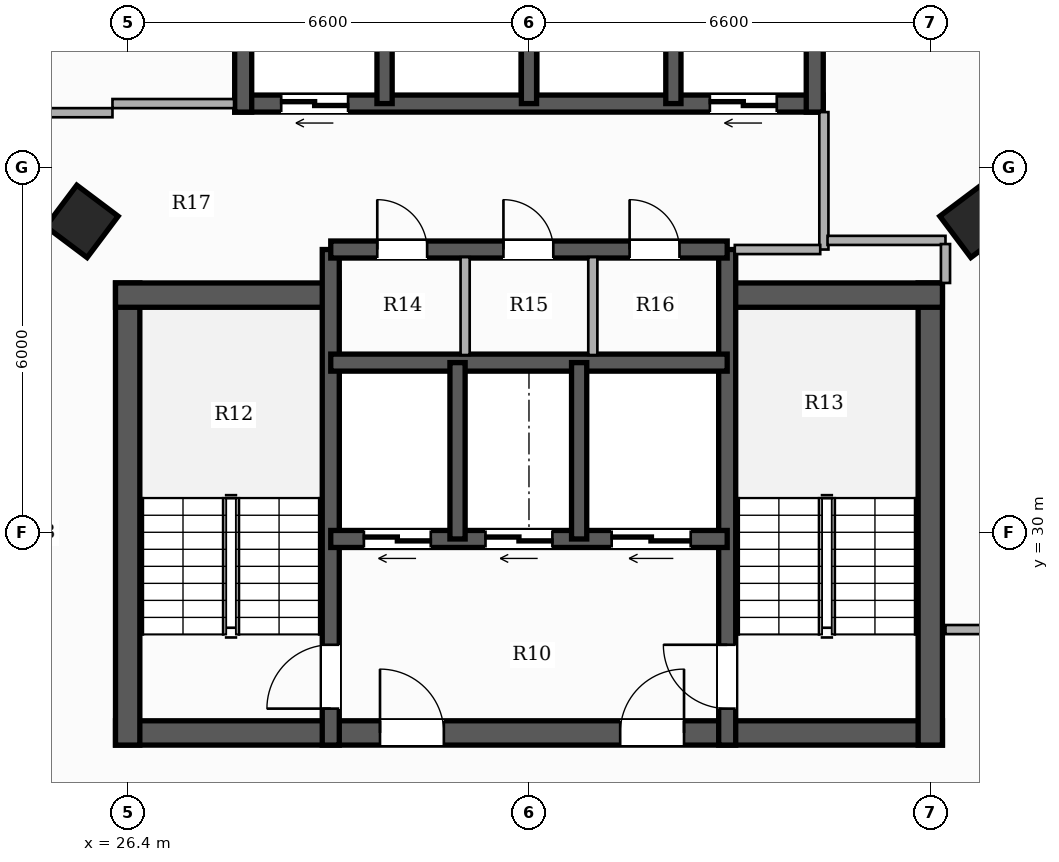
"""IFC4 building model, lengths in metres.
Left out: names, types, materials, properties, quantities, classifications, styles, units other than length and angle.
Written with IfcOpenShell. Run it as: python <this file> out.ifc"""

import sys

from ifc_helpers import new_model, si_unit, direction, frame, frame_2d, origin, origin_2d, place, context, subcontext, project, spatial, rectangle, hollow_rectangle, extrude, element, fill, save


model = new_model("IFC4")
c1 = context("Model", 3, precision=1e-05, world=origin(), true_north=direction((0.0, 1.0)))
c2 = subcontext(c1, "Body", "Model", "MODEL_VIEW")
j1 = project(units=[si_unit("LENGTHUNIT", "METRE"), si_unit("PLANEANGLEUNIT", "RADIAN")], contexts=[c1])
p1 = place(None, origin())
s1 = spatial("IfcSite", under=j1, at=p1, CompositionType="ELEMENT")
p2 = place(p1, origin())
s2 = spatial("IfcBuilding", under=s1, at=p2, CompositionType="ELEMENT")
p3 = place(p2, frame((0.0, 0.0, 150.65)))
s3 = spatial("IfcBuildingStorey", under=s2, at=p3, CompositionType="ELEMENT", Elevation=150.65)
p4 = place(p3, frame((26.2, 26.7, 0.0), z_axis=(0.0, 0.0, 1.0), x_axis=(1.0, 0.0, 0.0)))
e1 = element("IfcWall", 1, at=p4, inside=s3, PredefinedType="SHEAR", context=c2, shape_type="SweptSolid", body=[
    extrude(rectangle(XDim=13.6, YDim=0.4, at=frame_2d((6.8, 0.0))), origin(), (0.0, 0.0, 1.0), 3.3),
])
p5 = place(p4, frame((4.35, 0.0, 0.0)))
e2 = element("IfcOpeningElement", 2, at=p5, cuts=e1, PredefinedType="OPENING", context=c2, shape_type="SweptSolid", body=[
    extrude(rectangle(XDim=1.05, YDim=2.15, at=frame_2d((0.525, 1.075))), frame((0.0, 0.21, 0.0), z_axis=(0.0, -1.0, 0.0), x_axis=(1.0, 0.0, 0.0)), (0.0, 0.0, 1.0), 0.42),
])
p6 = place(p4, frame((8.3, 0.0, 0.0)))
e3 = element("IfcOpeningElement", 3, at=p6, cuts=e1, PredefinedType="OPENING", context=c2, shape_type="SweptSolid", body=[
    extrude(rectangle(XDim=1.05, YDim=2.15, at=frame_2d((0.525, 1.075))), frame((0.0, 0.21, 0.0), z_axis=(0.0, -1.0, 0.0), x_axis=(1.0, 0.0, 0.0)), (0.0, 0.0, 1.0), 0.42),
])
p7 = place(p3, frame((26.4, 26.5, 0.0), z_axis=(0.0, 0.0, 1.0), x_axis=(0.0, 1.0, 0.0)))
e4 = element("IfcWall", 4, at=p7, inside=s3, PredefinedType="SHEAR", context=c2, shape_type="SweptSolid", body=[
    extrude(rectangle(XDim=7.6, YDim=0.4, at=frame_2d((3.8, 0.0))), origin(), (0.0, 0.0, 1.0), 3.3),
])
p8 = place(p3, frame((26.2, 33.9, 0.0), z_axis=(0.0, 0.0, 1.0), x_axis=(1.0, 0.0, 0.0)))
e5 = element("IfcWall", 5, at=p8, inside=s3, PredefinedType="SHEAR", context=c2, shape_type="SweptSolid", body=[
    extrude(rectangle(XDim=3.68, YDim=0.4, at=frame_2d((1.84, 0.0))), origin(), (0.0, 0.0, 1.0), 3.3),
])
p9 = place(p3, frame((39.6, 26.5, 0.0), z_axis=(0.0, 0.0, 1.0), x_axis=(0.0, 1.0, 0.0)))
e6 = element("IfcWall", 6, at=p9, inside=s3, PredefinedType="SHEAR", context=c2, shape_type="SweptSolid", body=[
    extrude(rectangle(XDim=7.6, YDim=0.4, at=frame_2d((3.8, 0.0))), origin(), (0.0, 0.0, 1.0), 3.3),
])
p10 = place(p3, frame((36.12, 33.9, 0.0), z_axis=(0.0, 0.0, 1.0), x_axis=(1.0, 0.0, 0.0)))
e7 = element("IfcWall", 7, at=p10, inside=s3, PredefinedType="SHEAR", context=c2, shape_type="SweptSolid", body=[
    extrude(rectangle(XDim=3.68, YDim=0.4, at=frame_2d((1.84, 0.0))), origin(), (0.0, 0.0, 1.0), 3.3),
])
p11 = place(p3, frame((29.74, 26.5, 0.0), z_axis=(0.0, 0.0, 1.0), x_axis=(0.0, 1.0, 0.0)))
e8 = element("IfcWall", 8, at=p11, inside=s3, PredefinedType="SHEAR", context=c2, shape_type="SweptSolid", body=[
    extrude(rectangle(XDim=8.15, YDim=0.28, at=frame_2d((4.075, 0.0))), origin(), (0.0, 0.0, 1.0), 3.3),
])
p12 = place(p11, frame((0.6, 0.0, 0.0)))
e9 = element("IfcOpeningElement", 9, at=p12, cuts=e8, PredefinedType="OPENING", context=c2, shape_type="SweptSolid", body=[
    extrude(rectangle(XDim=1.05, YDim=2.15, at=frame_2d((0.525, 1.075))), frame((0.0, 0.15, 0.0), z_axis=(0.0, -1.0, 0.0), x_axis=(1.0, 0.0, 0.0)), (0.0, 0.0, 1.0), 0.3),
])
p13 = place(p3, frame((36.26, 26.5, 0.0), z_axis=(0.0, 0.0, 1.0), x_axis=(0.0, 1.0, 0.0)))
e10 = element("IfcWall", 10, at=p13, inside=s3, PredefinedType="SHEAR", context=c2, shape_type="SweptSolid", body=[
    extrude(rectangle(XDim=8.15, YDim=0.28, at=frame_2d((4.075, 0.0))), origin(), (0.0, 0.0, 1.0), 3.3),
])
p14 = place(p13, frame((0.6, 0.0, 0.0)))
e11 = element("IfcOpeningElement", 11, at=p14, cuts=e10, PredefinedType="OPENING", context=c2, shape_type="SweptSolid", body=[
    extrude(rectangle(XDim=1.05, YDim=2.15, at=frame_2d((0.525, 1.075))), frame((0.0, 0.15, 0.0), z_axis=(0.0, -1.0, 0.0), x_axis=(1.0, 0.0, 0.0)), (0.0, 0.0, 1.0), 0.3),
])
p15 = place(p3, frame((36.26, 29.89, 0.0), z_axis=(0.0, 0.0, 1.0), x_axis=(-1.0, 0.0, 0.0)))
e12 = element("IfcWall", 12, at=p15, inside=s3, PredefinedType="SHEAR", context=c2, shape_type="SweptSolid", body=[
    extrude(rectangle(XDim=6.52, YDim=0.28, at=frame_2d((3.26, 0.0))), origin(), (0.0, 0.0, 1.0), 3.3),
])
p16 = place(p15, frame((4.875, 0.0, 0.0)))
e13 = element("IfcOpeningElement", 13, at=p16, cuts=e12, PredefinedType="OPENING", context=c2, shape_type="SweptSolid", body=[
    extrude(rectangle(XDim=1.1, YDim=2.2, at=frame_2d((0.55, 1.1))), frame((0.0, 0.15, 0.0), z_axis=(0.0, -1.0, 0.0), x_axis=(1.0, 0.0, 0.0)), (0.0, 0.0, 1.0), 0.3),
])
p17 = place(p15, frame((2.875, 0.0, 0.0)))
e14 = element("IfcOpeningElement", 14, at=p17, cuts=e12, PredefinedType="OPENING", context=c2, shape_type="SweptSolid", body=[
    extrude(rectangle(XDim=1.1, YDim=2.2, at=frame_2d((0.55, 1.1))), frame((0.0, 0.15, 0.0), z_axis=(0.0, -1.0, 0.0), x_axis=(1.0, 0.0, 0.0)), (0.0, 0.0, 1.0), 0.3),
])
p18 = place(p15, frame((0.6, 0.0, 0.0)))
e15 = element("IfcOpeningElement", 15, at=p18, cuts=e12, PredefinedType="OPENING", context=c2, shape_type="SweptSolid", body=[
    extrude(rectangle(XDim=1.3, YDim=2.2, at=frame_2d((0.65, 1.1))), frame((0.0, 0.15, 0.0), z_axis=(0.0, -1.0, 0.0), x_axis=(1.0, 0.0, 0.0)), (0.0, 0.0, 1.0), 0.3),
])
p19 = place(p3, frame((29.74, 32.79, 0.0), z_axis=(0.0, 0.0, 1.0), x_axis=(1.0, 0.0, 0.0)))
e16 = element("IfcWall", 16, at=p19, inside=s3, PredefinedType="SHEAR", context=c2, shape_type="SweptSolid", body=[
    extrude(rectangle(XDim=6.52, YDim=0.28, at=frame_2d((3.26, 0.0))), origin(), (0.0, 0.0, 1.0), 3.3),
])
for number, where, z_axis, x_axis in (
    (17, (31.825, 29.89, 0.0), (0.0, 0.0, 1.0), (0.0, 1.0, 0.0)),
    (18, (33.825, 29.89, 0.0), (0.0, 0.0, 1.0), (0.0, 1.0, 0.0)),
):
    element("IfcWall", number, at=place(p3, frame(where, z_axis=z_axis, x_axis=x_axis)), inside=s3, PredefinedType="SHEAR", context=c2, shape_type="SweptSolid", body=[
        extrude(rectangle(XDim=2.9, YDim=0.25, at=frame_2d((1.45, 0.0))), origin(), (0.0, 0.0, 1.0), 3.3),
    ])
p20 = place(p3, frame((29.74, 34.65, 0.0), z_axis=(0.0, 0.0, 1.0), x_axis=(1.0, 0.0, 0.0)))
e19 = element("IfcWall", 19, at=p20, inside=s3, PredefinedType="SHEAR", context=c2, shape_type="SweptSolid", body=[
    extrude(rectangle(XDim=6.52, YDim=0.28, at=frame_2d((3.26, 0.0))), origin(), (0.0, 0.0, 1.0), 3.3),
])
p21 = place(p20, frame((0.765, 0.0, 0.0)))
e20 = element("IfcOpeningElement", 20, at=p21, cuts=e19, PredefinedType="OPENING", context=c2, shape_type="SweptSolid", body=[
    extrude(rectangle(XDim=0.82, YDim=2.1, at=frame_2d((0.41, 1.05))), frame((0.0, 0.15, 0.0), z_axis=(0.0, -1.0, 0.0), x_axis=(1.0, 0.0, 0.0)), (0.0, 0.0, 1.0), 0.3),
])
p22 = place(p20, frame((2.84, 0.0, 0.0)))
e21 = element("IfcOpeningElement", 21, at=p22, cuts=e19, PredefinedType="OPENING", context=c2, shape_type="SweptSolid", body=[
    extrude(rectangle(XDim=0.82, YDim=2.1, at=frame_2d((0.41, 1.05))), frame((0.0, 0.15, 0.0), z_axis=(0.0, -1.0, 0.0), x_axis=(1.0, 0.0, 0.0)), (0.0, 0.0, 1.0), 0.3),
])
p23 = place(p20, frame((4.915, 0.0, 0.0)))
e22 = element("IfcOpeningElement", 22, at=p23, cuts=e19, PredefinedType="OPENING", context=c2, shape_type="SweptSolid", body=[
    extrude(rectangle(XDim=0.82, YDim=2.1, at=frame_2d((0.41, 1.05))), frame((0.0, 0.15, 0.0), z_axis=(0.0, -1.0, 0.0), x_axis=(1.0, 0.0, 0.0)), (0.0, 0.0, 1.0), 0.3),
])
p24 = place(p3, frame((37.84, 37.05, 0.0), z_axis=(0.0, 0.0, 1.0), x_axis=(-1.0, 0.0, 0.0)))
e23 = element("IfcWall", 23, at=p24, inside=s3, PredefinedType="SHEAR", context=c2, shape_type="SweptSolid", body=[
    extrude(rectangle(XDim=9.68, YDim=0.28, at=frame_2d((4.84, 0.0))), origin(), (0.0, 0.0, 1.0), 3.3),
])
p25 = place(p24, frame((7.815, 0.0, 0.0)))
e24 = element("IfcOpeningElement", 24, at=p25, cuts=e23, PredefinedType="OPENING", context=c2, shape_type="SweptSolid", body=[
    extrude(rectangle(XDim=1.1, YDim=2.2, at=frame_2d((0.55, 1.1))), frame((0.0, 0.15, 0.0), z_axis=(0.0, -1.0, 0.0), x_axis=(1.0, 0.0, 0.0)), (0.0, 0.0, 1.0), 0.3),
])
p26 = place(p24, frame((0.765, 0.0, 0.0)))
e25 = element("IfcOpeningElement", 25, at=p26, cuts=e23, PredefinedType="OPENING", context=c2, shape_type="SweptSolid", body=[
    extrude(rectangle(XDim=1.1, YDim=2.2, at=frame_2d((0.55, 1.1))), frame((0.0, 0.15, 0.0), z_axis=(0.0, -1.0, 0.0), x_axis=(1.0, 0.0, 0.0)), (0.0, 0.0, 1.0), 0.3),
])
for number, where, z_axis, x_axis in (
    (26, (28.3, 36.91, 0.0), (0.0, 0.0, 1.0), (0.0, 1.0, 0.0)),
    (27, (37.7, 36.91, 0.0), (0.0, 0.0, 1.0), (0.0, 1.0, 0.0)),
):
    element("IfcWall", number, at=place(p3, frame(where, z_axis=z_axis, x_axis=x_axis)), inside=s3, PredefinedType="SHEAR", context=c2, shape_type="SweptSolid", body=[
        extrude(rectangle(XDim=2.83, YDim=0.28, at=frame_2d((1.415, 0.0))), origin(), (0.0, 0.0, 1.0), 3.3),
    ])
for number, where, z_axis, x_axis in (
    (28, (30.625, 37.05, 0.0), (0.0, 0.0, 1.0), (0.0, 1.0, 0.0)),
    (29, (33.0, 37.05, 0.0), (0.0, 0.0, 1.0), (0.0, 1.0, 0.0)),
    (30, (35.375, 37.05, 0.0), (0.0, 0.0, 1.0), (0.0, 1.0, 0.0)),
):
    element("IfcWall", number, at=place(p3, frame(where, z_axis=z_axis, x_axis=x_axis)), inside=s3, PredefinedType="SHEAR", context=c2, shape_type="SweptSolid", body=[
        extrude(rectangle(XDim=2.55, YDim=0.25, at=frame_2d((1.275, 0.0))), origin(), (0.0, 0.0, 1.0), 3.3),
    ])
for number, where, z_axis, x_axis in (
    (31, (25.648, 35.113, 0.0), (0.0, 0.0, 1.0), (0.6, 0.8, 0.0)),
    (32, (40.352, 35.113, 0.0), (0.0, 0.0, 1.0), (-0.6, 0.8, 0.0)),
):
    element("IfcColumn", number, at=place(p3, frame(where, z_axis=z_axis, x_axis=x_axis)), inside=s3, PredefinedType="COLUMN", context=c2, shape_type="SweptSolid", body=[
        extrude(hollow_rectangle(XDim=0.85, YDim=0.85, WallThickness=0.028, at=origin_2d()), origin(), (0.0, 0.0, 1.0), 3.3),
    ])
p27 = place(p3, frame((37.85, 34.65, 0.0), z_axis=(0.0, 0.0, 1.0), x_axis=(0.0, 1.0, 0.0)))
e33 = element("IfcWall", 33, at=p27, inside=s3, PredefinedType="PARTITIONING", context=c2, shape_type="SweptSolid", body=[
    extrude(rectangle(XDim=2.26, YDim=0.15, at=frame_2d((1.13, 0.0))), origin(), (0.0, 0.0, 1.0), 3.06),
])
p28 = place(p3, frame((36.385, 34.65, 0.0), z_axis=(0.0, 0.0, 1.0), x_axis=(1.0, 0.0, 0.0)))
e34 = element("IfcWall", 34, at=p28, inside=s3, PredefinedType="PARTITIONING", context=c2, shape_type="SweptSolid", body=[
    extrude(rectangle(XDim=1.405, YDim=0.15, at=frame_2d((0.703, 0.0))), origin(), (0.0, 0.0, 1.0), 2.425),
])
for number, where, z_axis, x_axis in (
    (35, (31.95, 32.915, 0.0), (0.0, 0.0, 1.0), (0.0, 1.0, 0.0)),
    (36, (34.05, 32.915, 0.0), (0.0, 0.0, 1.0), (0.0, 1.0, 0.0)),
):
    element("IfcWall", number, at=place(p3, frame(where, z_axis=z_axis, x_axis=x_axis)), inside=s3, PredefinedType="PARTITIONING", context=c2, shape_type="SweptSolid", body=[
        extrude(rectangle(XDim=1.61, YDim=0.15, at=frame_2d((0.805, 0.0))), origin(), (0.0, 0.0, 1.0), 3.06),
    ])
p29 = place(p3, frame((23.56, 36.9, 0.0), z_axis=(0.0, 0.0, 1.0), x_axis=(1.0, 0.0, 0.0)))
e37 = element("IfcWall", 37, at=p29, inside=s3, PredefinedType="PARTITIONING", context=c2, shape_type="SweptSolid", body=[
    extrude(rectangle(XDim=2.59, YDim=0.15, at=frame_2d((1.295, 0.0))), origin(), (0.0, 0.0, 1.0), 2.413),
])
p30 = place(p3, frame((39.85, 28.4, 0.0), z_axis=(0.0, 0.0, 1.0), x_axis=(1.0, 0.0, 0.0)))
e38 = element("IfcWall", 38, at=p30, inside=s3, PredefinedType="PARTITIONING", context=c2, shape_type="SweptSolid", body=[
    extrude(rectangle(XDim=2.5, YDim=0.15, at=frame_2d((1.25, 0.0))), origin(), (0.0, 0.0, 1.0), 2.721),
])
p31 = place(p30, frame((0.79, 0.0, 0.0)))
e39 = element("IfcOpeningElement", 39, at=p31, cuts=e38, PredefinedType="OPENING", context=c2, shape_type="SweptSolid", body=[
    extrude(rectangle(XDim=0.92, YDim=2.15, at=frame_2d((0.46, 1.075))), frame((0.0, 0.085, 0.0), z_axis=(0.0, -1.0, 0.0), x_axis=(1.0, 0.0, 0.0)), (0.0, 0.0, 1.0), 0.17),
])
p32 = place(p3, frame((26.15, 37.05, 0.0), z_axis=(0.0, 0.0, 1.0), x_axis=(1.0, 0.0, 0.0)))
e40 = element("IfcWall", 40, at=p32, inside=s3, PredefinedType="PARTITIONING", context=c2, shape_type="SweptSolid", body=[
    extrude(rectangle(XDim=2.0, YDim=0.15, at=frame_2d((1.0, 0.0))), origin(), (0.0, 0.0, 1.0), 2.413),
])
p33 = place(p3, frame((37.91, 34.8, 0.0), z_axis=(0.0, 0.0, 1.0), x_axis=(1.0, 0.0, 0.0)))
e41 = element("IfcWall", 41, at=p33, inside=s3, PredefinedType="PARTITIONING", context=c2, shape_type="SweptSolid", body=[
    extrude(rectangle(XDim=1.94, YDim=0.15, at=frame_2d((0.97, 0.0))), origin(), (0.0, 0.0, 1.0), 2.721),
])
p34 = place(p3, frame((39.85, 34.74, 0.0), z_axis=(0.0, 0.0, 1.0), x_axis=(0.0, -1.0, 0.0)))
e42 = element("IfcWall", 42, at=p34, inside=s3, PredefinedType="PARTITIONING", context=c2, shape_type="SweptSolid", body=[
    extrude(rectangle(XDim=0.64, YDim=0.15, at=frame_2d((0.32, 0.0))), origin(), (0.0, 0.0, 1.0), 2.721),
])
p35 = place(p12, origin())
e43 = element("IfcDoor", 43, at=p35, inside=s3, OperationType="SINGLE_SWING_LEFT", PredefinedType="DOOR", context=c2, shape_type="SweptSolid", body=[
    extrude(rectangle(XDim=1.05, YDim=2.15, at=frame_2d((0.525, 1.075))), frame((0.0, 0.025, 0.0), z_axis=(0.0, -1.0, 0.0), x_axis=(1.0, 0.0, 0.0)), (0.0, 0.0, 1.0), 0.05),
])
fill(e9, e43)
p36 = place(p14, origin())
e44 = element("IfcDoor", 44, at=p36, inside=s3, OperationType="SINGLE_SWING_RIGHT", PredefinedType="DOOR", context=c2, shape_type="SweptSolid", body=[
    extrude(rectangle(XDim=1.05, YDim=2.15, at=frame_2d((0.525, 1.075))), frame((0.0, 0.025, 0.0), z_axis=(0.0, -1.0, 0.0), x_axis=(1.0, 0.0, 0.0)), (0.0, 0.0, 1.0), 0.05),
])
fill(e11, e44)
p37 = place(p5, origin())
e45 = element("IfcDoor", 45, at=p37, inside=s3, OperationType="SINGLE_SWING_LEFT", PredefinedType="DOOR", context=c2, shape_type="SweptSolid", body=[
    extrude(rectangle(XDim=1.05, YDim=2.15, at=frame_2d((0.525, 1.075))), frame((0.0, 0.025, 0.0), z_axis=(0.0, -1.0, 0.0), x_axis=(1.0, 0.0, 0.0)), (0.0, 0.0, 1.0), 0.05),
])
fill(e2, e45)
p38 = place(p6, origin())
e46 = element("IfcDoor", 46, at=p38, inside=s3, OperationType="SINGLE_SWING_RIGHT", PredefinedType="DOOR", context=c2, shape_type="SweptSolid", body=[
    extrude(rectangle(XDim=1.05, YDim=2.15, at=frame_2d((0.525, 1.075))), frame((0.0, 0.025, 0.0), z_axis=(0.0, -1.0, 0.0), x_axis=(1.0, 0.0, 0.0)), (0.0, 0.0, 1.0), 0.05),
])
fill(e3, e46)
p39 = place(p16, origin())
e47 = element("IfcDoor", 47, at=p39, inside=s3, OperationType="DOUBLE_DOOR_SLIDING", PredefinedType="DOOR", context=c2, shape_type="SweptSolid", body=[
    extrude(rectangle(XDim=1.1, YDim=2.2, at=frame_2d((0.55, 1.1))), frame((0.0, 0.025, 0.0), z_axis=(0.0, -1.0, 0.0), x_axis=(1.0, 0.0, 0.0)), (0.0, 0.0, 1.0), 0.05),
])
fill(e13, e47)
p40 = place(p17, origin())
e48 = element("IfcDoor", 48, at=p40, inside=s3, OperationType="DOUBLE_DOOR_SLIDING", PredefinedType="DOOR", context=c2, shape_type="SweptSolid", body=[
    extrude(rectangle(XDim=1.1, YDim=2.2, at=frame_2d((0.55, 1.1))), frame((0.0, 0.025, 0.0), z_axis=(0.0, -1.0, 0.0), x_axis=(1.0, 0.0, 0.0)), (0.0, 0.0, 1.0), 0.05),
])
fill(e14, e48)
p41 = place(p18, origin())
e49 = element("IfcDoor", 49, at=p41, inside=s3, OperationType="DOUBLE_DOOR_SLIDING", PredefinedType="DOOR", context=c2, shape_type="SweptSolid", body=[
    extrude(rectangle(XDim=1.3, YDim=2.2, at=frame_2d((0.65, 1.1))), frame((0.0, 0.025, 0.0), z_axis=(0.0, -1.0, 0.0), x_axis=(1.0, 0.0, 0.0)), (0.0, 0.0, 1.0), 0.05),
])
fill(e15, e49)
p42 = place(p25, origin())
e50 = element("IfcDoor", 50, at=p42, inside=s3, OperationType="DOUBLE_DOOR_SLIDING", PredefinedType="DOOR", context=c2, shape_type="SweptSolid", body=[
    extrude(rectangle(XDim=1.1, YDim=2.2, at=frame_2d((0.55, 1.1))), frame((0.0, 0.025, 0.0), z_axis=(0.0, -1.0, 0.0), x_axis=(1.0, 0.0, 0.0)), (0.0, 0.0, 1.0), 0.05),
])
fill(e24, e50)
p43 = place(p26, origin())
e51 = element("IfcDoor", 51, at=p43, inside=s3, OperationType="DOUBLE_DOOR_SLIDING", PredefinedType="DOOR", context=c2, shape_type="SweptSolid", body=[
    extrude(rectangle(XDim=1.1, YDim=2.2, at=frame_2d((0.55, 1.1))), frame((0.0, 0.025, 0.0), z_axis=(0.0, -1.0, 0.0), x_axis=(1.0, 0.0, 0.0)), (0.0, 0.0, 1.0), 0.05),
])
fill(e25, e51)
p44 = place(p21, origin())
e52 = element("IfcDoor", 52, at=p44, inside=s3, OperationType="SINGLE_SWING_LEFT", PredefinedType="DOOR", context=c2, shape_type="SweptSolid", body=[
    extrude(rectangle(XDim=0.82, YDim=2.1, at=frame_2d((0.41, 1.05))), frame((0.0, 0.025, 0.0), z_axis=(0.0, -1.0, 0.0), x_axis=(1.0, 0.0, 0.0)), (0.0, 0.0, 1.0), 0.05),
])
fill(e20, e52)
p45 = place(p22, origin())
e53 = element("IfcDoor", 53, at=p45, inside=s3, OperationType="SINGLE_SWING_LEFT", PredefinedType="DOOR", context=c2, shape_type="SweptSolid", body=[
    extrude(rectangle(XDim=0.82, YDim=2.1, at=frame_2d((0.41, 1.05))), frame((0.0, 0.025, 0.0), z_axis=(0.0, -1.0, 0.0), x_axis=(1.0, 0.0, 0.0)), (0.0, 0.0, 1.0), 0.05),
])
fill(e21, e53)
p46 = place(p23, origin())
e54 = element("IfcDoor", 54, at=p46, inside=s3, OperationType="SINGLE_SWING_LEFT", PredefinedType="DOOR", context=c2, shape_type="SweptSolid", body=[
    extrude(rectangle(XDim=0.82, YDim=2.1, at=frame_2d((0.41, 1.05))), frame((0.0, 0.025, 0.0), z_axis=(0.0, -1.0, 0.0), x_axis=(1.0, 0.0, 0.0)), (0.0, 0.0, 1.0), 0.05),
])
fill(e22, e54)
save(model, sys.argv[1])
